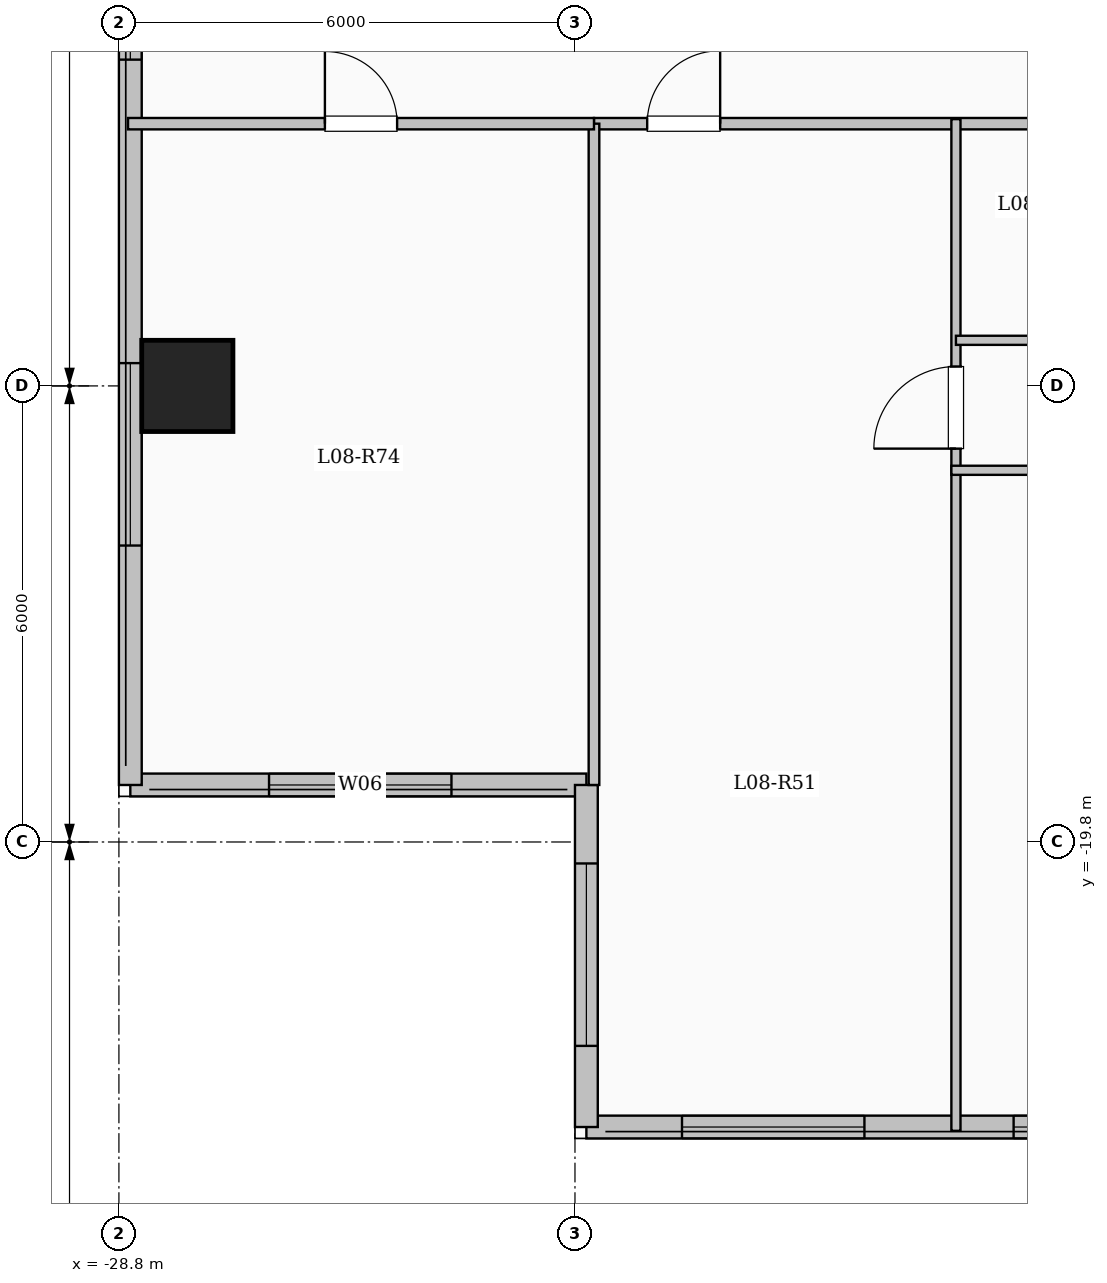
"""IFC4 building model, lengths in metres.
Left out: names, types, materials, properties, quantities, classifications, styles, units other than length and angle.
Written with IfcOpenShell. Run it as: python <this file> out.ifc"""

import sys

from ifc_helpers import new_model, si_unit, direction, frame, frame_2d, origin, origin_2d, place, context, subcontext, project, spatial, rectangle, extrude, element, fill, save


model = new_model("IFC4")
c1 = context("Model", 3, precision=1e-05, world=origin(), true_north=direction((0.0, 1.0)))
c2 = subcontext(c1, "Body", "Model", "MODEL_VIEW")
j1 = project(units=[si_unit("LENGTHUNIT", "METRE"), si_unit("PLANEANGLEUNIT", "RADIAN")], contexts=[c1])
p1 = place(None, origin())
s1 = spatial("IfcSite", under=j1, at=p1, CompositionType="ELEMENT")
p2 = place(p1, origin())
s2 = spatial("IfcBuilding", under=s1, at=p2, CompositionType="ELEMENT")
p3 = place(p2, frame((0.0, 0.0, 34.05)))
s3 = spatial("IfcBuildingStorey", under=s2, at=p3, CompositionType="ELEMENT", Elevation=34.05)
p4 = place(p3, frame((-27.9, -13.8, 0.0), z_axis=(0.0, 0.0, 1.0), x_axis=(1.0, 0.0, 0.0)))
e1 = element("IfcColumn", 1, at=p4, inside=s3, PredefinedType="COLUMN", context=c2, shape_type="SweptSolid", body=[
    extrude(rectangle(XDim=1.2, YDim=1.2, at=origin_2d()), origin(), (0.0, 0.0, 1.0), 3.35),
])
p5 = place(p3, frame((-22.65, -19.05, 0.0), z_axis=(0.0, 0.0, 1.0), x_axis=(-1.0, 0.0, 0.0)))
e2 = element("IfcWall", 2, at=p5, inside=s3, PredefinedType="SOLIDWALL", context=c2, shape_type="SweptSolid", body=[
    extrude(rectangle(XDim=6.0, YDim=0.3, at=frame_2d((3.0, 0.0))), origin(), (0.0, 0.0, 1.0), 3.1),
])
p6 = place(p5, frame((1.775, 0.0, 0.9)))
e3 = element("IfcOpeningElement", 3, at=p6, cuts=e2, PredefinedType="OPENING", context=c2, shape_type="SweptSolid", body=[
    extrude(rectangle(XDim=2.4, YDim=1.8, at=frame_2d((1.2, 0.9))), frame((0.0, 0.16, 0.0), z_axis=(0.0, -1.0, 0.0), x_axis=(1.0, 0.0, 0.0)), (0.0, 0.0, 1.0), 0.32),
])
p7 = place(p3, frame((-28.65, -19.05, 0.0), z_axis=(0.0, 0.0, 1.0), x_axis=(0.0, 1.0, 0.0)))
e4 = element("IfcWall", 4, at=p7, inside=s3, PredefinedType="SOLIDWALL", context=c2, shape_type="SweptSolid", body=[
    extrude(rectangle(XDim=38.1, YDim=0.3, at=frame_2d((19.05, 0.0))), origin(), (0.0, 0.0, 1.0), 3.1),
])
p8 = place(p7, frame((3.15, 0.0, 0.9)))
e5 = element("IfcOpeningElement", 5, at=p8, cuts=e4, PredefinedType="OPENING", context=c2, shape_type="SweptSolid", body=[
    extrude(rectangle(XDim=2.4, YDim=1.8, at=frame_2d((1.2, 0.9))), frame((0.0, 0.16, 0.0), z_axis=(0.0, -1.0, 0.0), x_axis=(1.0, 0.0, 0.0)), (0.0, 0.0, 1.0), 0.32),
])
p9 = place(p7, frame((9.542, 0.0, 0.9)))
e6 = element("IfcOpeningElement", 6, at=p9, cuts=e4, PredefinedType="OPENING", context=c2, shape_type="SweptSolid", body=[
    extrude(rectangle(XDim=1.5, YDim=1.65, at=frame_2d((0.75, 0.825))), frame((0.0, 0.16, 0.0), z_axis=(0.0, -1.0, 0.0), x_axis=(1.0, 0.0, 0.0)), (0.0, 0.0, 1.0), 0.32),
])
p10 = place(p7, frame((19.8, 0.0, 0.9)))
e7 = element("IfcOpeningElement", 7, at=p10, cuts=e4, PredefinedType="OPENING", context=c2, shape_type="SweptSolid", body=[
    extrude(rectangle(XDim=2.0, YDim=1.7, at=frame_2d((1.0, 0.85))), frame((0.0, 0.16, 0.0), z_axis=(0.0, -1.0, 0.0), x_axis=(1.0, 0.0, 0.0)), (0.0, 0.0, 1.0), 0.32),
])
p11 = place(p7, frame((30.175, 0.0, 0.95)))
e8 = element("IfcOpeningElement", 8, at=p11, cuts=e4, PredefinedType="OPENING", context=c2, shape_type="SweptSolid", body=[
    extrude(rectangle(XDim=1.0, YDim=1.5, at=frame_2d((0.5, 0.75))), frame((0.0, 0.16, 0.0), z_axis=(0.0, -1.0, 0.0), x_axis=(1.0, 0.0, 0.0)), (0.0, 0.0, 1.0), 0.32),
])
p12 = place(p7, frame((33.85, 0.0, 0.9)))
e9 = element("IfcOpeningElement", 9, at=p12, cuts=e4, PredefinedType="OPENING", context=c2, shape_type="SweptSolid", body=[
    extrude(rectangle(XDim=2.0, YDim=1.7, at=frame_2d((1.0, 0.85))), frame((0.0, 0.16, 0.0), z_axis=(0.0, -1.0, 0.0), x_axis=(1.0, 0.0, 0.0)), (0.0, 0.0, 1.0), 0.32),
])
p13 = place(p3, frame((-7.35, -23.55, 0.0), z_axis=(0.0, 0.0, 1.0), x_axis=(-1.0, 0.0, 0.0)))
e10 = element("IfcWall", 10, at=p13, inside=s3, PredefinedType="SOLIDWALL", context=c2, shape_type="SweptSolid", body=[
    extrude(rectangle(XDim=15.3, YDim=0.3, at=frame_2d((7.65, 0.0))), origin(), (0.0, 0.0, 1.0), 3.1),
])
p14 = place(p13, frame((0.147, 0.0, 0.95)))
e11 = element("IfcOpeningElement", 11, at=p14, cuts=e10, PredefinedType="OPENING", context=c2, shape_type="SweptSolid", body=[
    extrude(rectangle(XDim=0.85, YDim=1.5, at=frame_2d((0.425, 0.75))), frame((0.0, 0.16, 0.0), z_axis=(0.0, -1.0, 0.0), x_axis=(1.0, 0.0, 0.0)), (0.0, 0.0, 1.0), 0.32),
])
p15 = place(p13, frame((2.034, 0.0, 0.9)))
e12 = element("IfcOpeningElement", 12, at=p15, cuts=e10, PredefinedType="OPENING", context=c2, shape_type="SweptSolid", body=[
    extrude(rectangle(XDim=1.5, YDim=1.65, at=frame_2d((0.75, 0.825))), frame((0.0, 0.16, 0.0), z_axis=(0.0, -1.0, 0.0), x_axis=(1.0, 0.0, 0.0)), (0.0, 0.0, 1.0), 0.32),
])
p16 = place(p13, frame((5.119, 0.0, 0.9)))
e13 = element("IfcOpeningElement", 13, at=p16, cuts=e10, PredefinedType="OPENING", context=c2, shape_type="SweptSolid", body=[
    extrude(rectangle(XDim=1.5, YDim=1.65, at=frame_2d((0.75, 0.825))), frame((0.0, 0.16, 0.0), z_axis=(0.0, -1.0, 0.0), x_axis=(1.0, 0.0, 0.0)), (0.0, 0.0, 1.0), 0.32),
])
p17 = place(p13, frame((8.179, 0.0, 0.9)))
e14 = element("IfcOpeningElement", 14, at=p17, cuts=e10, PredefinedType="OPENING", context=c2, shape_type="SweptSolid", body=[
    extrude(rectangle(XDim=1.5, YDim=1.65, at=frame_2d((0.75, 0.825))), frame((0.0, 0.16, 0.0), z_axis=(0.0, -1.0, 0.0), x_axis=(1.0, 0.0, 0.0)), (0.0, 0.0, 1.0), 0.32),
])
p18 = place(p13, frame((11.642, 0.0, 0.9)))
e15 = element("IfcOpeningElement", 15, at=p18, cuts=e10, PredefinedType="OPENING", context=c2, shape_type="SweptSolid", body=[
    extrude(rectangle(XDim=2.4, YDim=1.8, at=frame_2d((1.2, 0.9))), frame((0.0, 0.16, 0.0), z_axis=(0.0, -1.0, 0.0), x_axis=(1.0, 0.0, 0.0)), (0.0, 0.0, 1.0), 0.32),
])
p19 = place(p3, frame((-22.65, -23.55, 0.0), z_axis=(0.0, 0.0, 1.0), x_axis=(0.0, 1.0, 0.0)))
e16 = element("IfcWall", 16, at=p19, inside=s3, PredefinedType="SOLIDWALL", context=c2, shape_type="SweptSolid", body=[
    extrude(rectangle(XDim=4.5, YDim=0.3, at=frame_2d((2.25, 0.0))), origin(), (0.0, 0.0, 1.0), 3.1),
])
p20 = place(p19, frame((1.067, 0.0, 0.9)))
e17 = element("IfcOpeningElement", 17, at=p20, cuts=e16, PredefinedType="OPENING", context=c2, shape_type="SweptSolid", body=[
    extrude(rectangle(XDim=2.4, YDim=1.8, at=frame_2d((1.2, 0.9))), frame((0.0, 0.16, 0.0), z_axis=(0.0, -1.0, 0.0), x_axis=(1.0, 0.0, 0.0)), (0.0, 0.0, 1.0), 0.32),
])
p21 = place(p3, frame((-22.55, -10.35, 0.0), z_axis=(0.0, 0.0, 1.0), x_axis=(1.0, 0.0, 0.0)))
e18 = element("IfcWall", 18, at=p21, inside=s3, PredefinedType="PARTITIONING", context=c2, shape_type="SweptSolid", body=[
    extrude(rectangle(XDim=14.0, YDim=0.15, at=frame_2d((7.0, 0.0))), origin(), (0.0, 0.0, 1.0), 3.1),
])
p22 = place(p21, frame((0.7, 0.0, 0.0)))
e19 = element("IfcOpeningElement", 19, at=p22, cuts=e18, PredefinedType="OPENING", context=c2, shape_type="SweptSolid", body=[
    extrude(rectangle(XDim=0.96, YDim=2.15, at=frame_2d((0.48, 1.075))), frame((0.0, 0.085, 0.0), z_axis=(0.0, -1.0, 0.0), x_axis=(1.0, 0.0, 0.0)), (0.0, 0.0, 1.0), 0.17),
])
p23 = place(p3, frame((-17.788, -23.6, 0.0), z_axis=(0.0, 0.0, 1.0), x_axis=(0.0, 1.0, 0.0)))
e20 = element("IfcWall", 20, at=p23, inside=s3, PredefinedType="PARTITIONING", context=c2, shape_type="SweptSolid", body=[
    extrude(rectangle(XDim=13.31, YDim=0.12, at=frame_2d((6.655, 0.0))), origin(), (0.0, 0.0, 1.0), 3.1),
])
p24 = place(p23, frame((8.975, 0.0, 0.0)))
e21 = element("IfcOpeningElement", 21, at=p24, cuts=e20, PredefinedType="OPENING", context=c2, shape_type="SweptSolid", body=[
    extrude(rectangle(XDim=1.08, YDim=2.15, at=frame_2d((0.54, 1.075))), frame((0.0, 0.07, 0.0), z_axis=(0.0, -1.0, 0.0), x_axis=(1.0, 0.0, 0.0)), (0.0, 0.0, 1.0), 0.14),
])
p25 = place(p3, frame((-17.788, -13.2, 0.0), z_axis=(0.0, 0.0, 1.0), x_axis=(1.0, 0.0, 0.0)))
e22 = element("IfcWall", 22, at=p25, inside=s3, PredefinedType="PARTITIONING", context=c2, shape_type="SweptSolid", body=[
    extrude(rectangle(XDim=4.473, YDim=0.12, at=frame_2d((2.237, 0.0))), origin(), (0.0, 0.0, 1.0), 3.1),
])
p26 = place(p25, frame((1.797, 0.0, 0.0)))
e23 = element("IfcOpeningElement", 23, at=p26, cuts=e22, PredefinedType="OPENING", context=c2, shape_type="SweptSolid", body=[
    extrude(rectangle(XDim=0.88, YDim=2.1, at=frame_2d((0.44, 1.05))), frame((0.0, 0.07, 0.0), z_axis=(0.0, -1.0, 0.0), x_axis=(1.0, 0.0, 0.0)), (0.0, 0.0, 1.0), 0.14),
])
p27 = place(p3, frame((-17.848, -14.91, 0.0), z_axis=(0.0, 0.0, 1.0), x_axis=(1.0, 0.0, 0.0)))
e24 = element("IfcWall", 24, at=p27, inside=s3, PredefinedType="PARTITIONING", context=c2, shape_type="SweptSolid", body=[
    extrude(rectangle(XDim=9.308, YDim=0.12, at=frame_2d((4.654, 0.0))), origin(), (0.0, 0.0, 1.0), 2.585),
])
p28 = place(p27, frame((1.081, 0.0, 0.0)))
e25 = element("IfcOpeningElement", 25, at=p28, cuts=e24, PredefinedType="OPENING", context=c2, shape_type="SweptSolid", body=[
    extrude(rectangle(XDim=0.88, YDim=2.1, at=frame_2d((0.44, 1.05))), frame((0.0, 0.07, 0.0), z_axis=(0.0, -1.0, 0.0), x_axis=(1.0, 0.0, 0.0)), (0.0, 0.0, 1.0), 0.14),
])
p29 = place(p27, frame((4.124, 0.0, 0.0)))
e26 = element("IfcOpeningElement", 26, at=p29, cuts=e24, PredefinedType="OPENING", context=c2, shape_type="SweptSolid", body=[
    extrude(rectangle(XDim=0.88, YDim=2.1, at=frame_2d((0.44, 1.05))), frame((0.0, 0.07, 0.0), z_axis=(0.0, -1.0, 0.0), x_axis=(1.0, 0.0, 0.0)), (0.0, 0.0, 1.0), 0.14),
])
p30 = place(p27, frame((7.167, 0.0, 0.0)))
e27 = element("IfcOpeningElement", 27, at=p30, cuts=e24, PredefinedType="OPENING", context=c2, shape_type="SweptSolid", body=[
    extrude(rectangle(XDim=0.88, YDim=2.1, at=frame_2d((0.44, 1.05))), frame((0.0, 0.07, 0.0), z_axis=(0.0, -1.0, 0.0), x_axis=(1.0, 0.0, 0.0)), (0.0, 0.0, 1.0), 0.14),
])
p31 = place(p3, frame((-22.55, -19.05, 0.0), z_axis=(0.0, 0.0, 1.0), x_axis=(0.0, 1.0, 0.0)))
e28 = element("IfcWall", 28, at=p31, inside=s3, PredefinedType="PARTITIONING", context=c2, shape_type="SweptSolid", body=[
    extrude(rectangle(XDim=8.7, YDim=0.14, at=frame_2d((4.35, 0.0))), origin(), (0.0, 0.0, 1.0), 3.1),
])
p32 = place(p3, frame((-28.68, -10.35, 0.0), z_axis=(0.0, 0.0, 1.0), x_axis=(1.0, 0.0, 0.0)))
e29 = element("IfcWall", 29, at=p32, inside=s3, PredefinedType="PARTITIONING", context=c2, shape_type="SweptSolid", body=[
    extrude(rectangle(XDim=6.13, YDim=0.15, at=frame_2d((3.065, 0.0))), origin(), (0.0, 0.0, 1.0), 3.1),
])
p33 = place(p32, frame((2.59, 0.0, 0.0)))
e30 = element("IfcOpeningElement", 30, at=p33, cuts=e29, PredefinedType="OPENING", context=c2, shape_type="SweptSolid", body=[
    extrude(rectangle(XDim=0.95, YDim=2.15, at=frame_2d((0.475, 1.075))), frame((0.0, 0.085, 0.0), z_axis=(0.0, -1.0, 0.0), x_axis=(1.0, 0.0, 0.0)), (0.0, 0.0, 1.0), 0.17),
])
p34 = place(p6, origin())
e31 = element("IfcWindow", 31, at=p34, inside=s3, PartitioningType="SINGLE_PANEL", PredefinedType="WINDOW", context=c2, shape_type="SweptSolid", body=[
    extrude(rectangle(XDim=2.4, YDim=1.8, at=frame_2d((1.2, 0.9))), frame((0.0, 0.03, 0.0), z_axis=(0.0, -1.0, 0.0), x_axis=(1.0, 0.0, 0.0)), (0.0, 0.0, 1.0), 0.06),
])
fill(e3, e31)
p35 = place(p8, origin())
e32 = element("IfcWindow", 32, at=p35, inside=s3, PartitioningType="SINGLE_PANEL", PredefinedType="WINDOW", context=c2, shape_type="SweptSolid", body=[
    extrude(rectangle(XDim=2.4, YDim=1.8, at=frame_2d((1.2, 0.9))), frame((0.0, 0.03, 0.0), z_axis=(0.0, -1.0, 0.0), x_axis=(1.0, 0.0, 0.0)), (0.0, 0.0, 1.0), 0.06),
])
fill(e5, e32)
p36 = place(p9, origin())
e33 = element("IfcWindow", 33, at=p36, inside=s3, PartitioningType="SINGLE_PANEL", PredefinedType="WINDOW", context=c2, shape_type="SweptSolid", body=[
    extrude(rectangle(XDim=1.5, YDim=1.65, at=frame_2d((0.75, 0.825))), frame((0.0, 0.03, 0.0), z_axis=(0.0, -1.0, 0.0), x_axis=(1.0, 0.0, 0.0)), (0.0, 0.0, 1.0), 0.06),
])
fill(e6, e33)
p37 = place(p17, origin())
e34 = element("IfcWindow", 34, at=p37, inside=s3, PartitioningType="SINGLE_PANEL", PredefinedType="WINDOW", context=c2, shape_type="SweptSolid", body=[
    extrude(rectangle(XDim=1.5, YDim=1.65, at=frame_2d((0.75, 0.825))), frame((0.0, 0.03, 0.0), z_axis=(0.0, -1.0, 0.0), x_axis=(1.0, 0.0, 0.0)), (0.0, 0.0, 1.0), 0.06),
])
fill(e14, e34)
p38 = place(p18, origin())
e35 = element("IfcWindow", 35, at=p38, inside=s3, PartitioningType="SINGLE_PANEL", PredefinedType="WINDOW", context=c2, shape_type="SweptSolid", body=[
    extrude(rectangle(XDim=2.4, YDim=1.8, at=frame_2d((1.2, 0.9))), frame((0.0, 0.03, 0.0), z_axis=(0.0, -1.0, 0.0), x_axis=(1.0, 0.0, 0.0)), (0.0, 0.0, 1.0), 0.06),
])
fill(e15, e35)
p39 = place(p20, origin())
e36 = element("IfcWindow", 36, at=p39, inside=s3, PartitioningType="SINGLE_PANEL", PredefinedType="WINDOW", context=c2, shape_type="SweptSolid", body=[
    extrude(rectangle(XDim=2.4, YDim=1.8, at=frame_2d((1.2, 0.9))), frame((0.0, 0.03, 0.0), z_axis=(0.0, -1.0, 0.0), x_axis=(1.0, 0.0, 0.0)), (0.0, 0.0, 1.0), 0.06),
])
fill(e17, e36)
p40 = place(p22, origin())
e37 = element("IfcDoor", 37, at=p40, inside=s3, OperationType="SINGLE_SWING_RIGHT", PredefinedType="DOOR", context=c2, shape_type="SweptSolid", body=[
    extrude(rectangle(XDim=0.96, YDim=2.15, at=frame_2d((0.48, 1.075))), frame((0.0, 0.025, 0.0), z_axis=(0.0, -1.0, 0.0), x_axis=(1.0, 0.0, 0.0)), (0.0, 0.0, 1.0), 0.05),
])
fill(e19, e37)
p41 = place(p24, origin())
e38 = element("IfcDoor", 38, at=p41, inside=s3, OperationType="SINGLE_SWING_LEFT", PredefinedType="DOOR", context=c2, shape_type="SweptSolid", body=[
    extrude(rectangle(XDim=1.08, YDim=2.15, at=frame_2d((0.54, 1.075))), frame((0.0, 0.025, 0.0), z_axis=(0.0, -1.0, 0.0), x_axis=(1.0, 0.0, 0.0)), (0.0, 0.0, 1.0), 0.05),
])
fill(e21, e38)
p42 = place(p33, origin())
e39 = element("IfcDoor", 39, at=p42, inside=s3, OperationType="SINGLE_SWING_LEFT", PredefinedType="DOOR", context=c2, shape_type="SweptSolid", body=[
    extrude(rectangle(XDim=0.95, YDim=2.15, at=frame_2d((0.475, 1.075))), frame((0.0, 0.025, 0.0), z_axis=(0.0, -1.0, 0.0), x_axis=(1.0, 0.0, 0.0)), (0.0, 0.0, 1.0), 0.05),
])
fill(e30, e39)
save(model, sys.argv[1])
